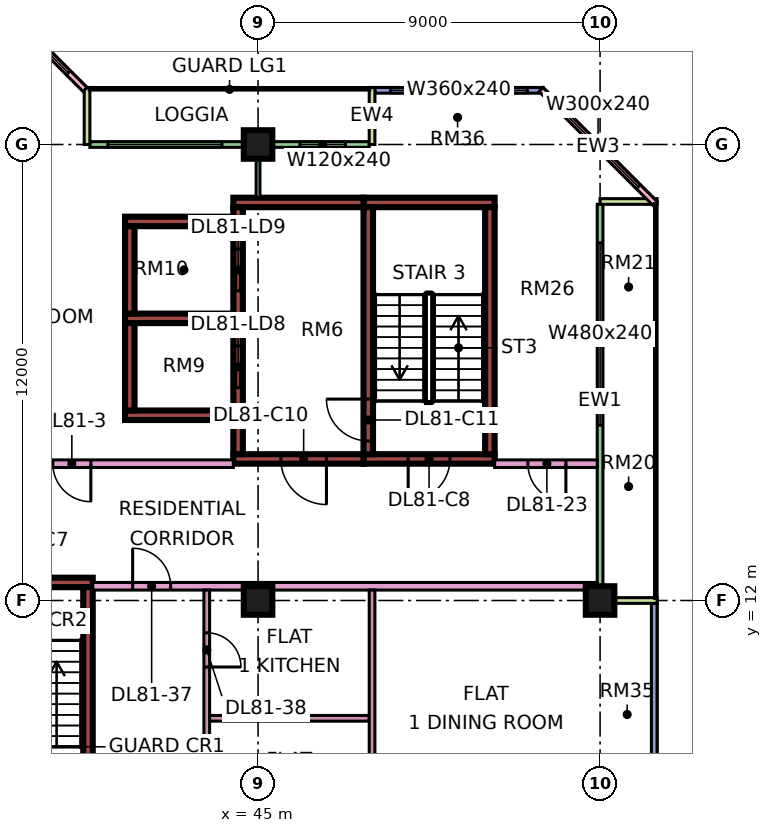
"""IFC4 building model, lengths in metres.
Left out: names, types, materials, properties, quantities, classifications, styles, units other than length and angle.
Written with IfcOpenShell. Run it as: python <this file> out.ifc"""

import sys

from ifc_helpers import new_model, si_unit, direction, frame, frame_2d, origin, origin_2d, place, context, subcontext, project, spatial, rectangle, extrude, element, fill, save


model = new_model("IFC4")
c1 = context("Model", 3, precision=1e-05, world=origin(), true_north=direction((0.0, 1.0)))
c2 = subcontext(c1, "Body", "Model", "MODEL_VIEW")
j1 = project(units=[si_unit("LENGTHUNIT", "METRE"), si_unit("PLANEANGLEUNIT", "RADIAN")], contexts=[c1])
p1 = place(None, origin())
s1 = spatial("IfcSite", under=j1, at=p1, CompositionType="ELEMENT")
p2 = place(p1, origin())
s2 = spatial("IfcBuilding", under=s1, at=p2, CompositionType="ELEMENT")
p3 = place(p2, frame((0.0, 0.0, 350.15)))
s3 = spatial("IfcBuildingStorey", under=s2, at=p3, CompositionType="ELEMENT", Elevation=350.15)
for number, where, z_axis, x_axis in (
    (1, (45.0, 12.0, 0.0), (0.0, 0.0, 1.0), (1.0, 0.0, 0.0)),
    (2, (45.0, 24.0, 0.0), (0.0, 0.0, 1.0), (1.0, 0.0, 0.0)),
    (3, (54.0, 12.0, 0.0), (0.0, 0.0, 1.0), (1.0, 0.0, 0.0)),
):
    element("IfcColumn", number, at=place(p3, frame(where, z_axis=z_axis, x_axis=x_axis)), inside=s3, PredefinedType="COLUMN", context=c2, shape_type="SweptSolid", body=[
        extrude(rectangle(XDim=0.75, YDim=0.75, at=origin_2d()), origin(), (0.0, 0.0, 1.0), 3.75),
    ])
p4 = place(p3, frame((36.375, 12.475, 0.0), z_axis=(0.0, 0.0, 1.0), x_axis=(1.0, 0.0, 0.0)))
e4 = element("IfcWall", 4, at=p4, inside=s3, PredefinedType="SHEAR", context=c2, shape_type="SweptSolid", body=[
    extrude(rectangle(XDim=4.275, YDim=0.25, at=frame_2d((2.137, 0.0))), origin(), (0.0, 0.0, 1.0), 3.75),
])
p5 = place(p4, frame((2.0, 0.0, 0.0)))
e5 = element("IfcOpeningElement", 5, at=p5, cuts=e4, PredefinedType="OPENING", context=c2, shape_type="SweptSolid", body=[
    extrude(rectangle(XDim=1.1, YDim=2.2, at=frame_2d((0.55, 1.1))), frame((0.0, 0.135, 0.0), z_axis=(0.0, -1.0, 0.0), x_axis=(1.0, 0.0, 0.0)), (0.0, 0.0, 1.0), 0.27),
])
p6 = place(p3, frame((40.525, 5.85, 0.0), z_axis=(0.0, 0.0, 1.0), x_axis=(0.0, 1.0, 0.0)))
e6 = element("IfcWall", 6, at=p6, inside=s3, PredefinedType="SHEAR", context=c2, shape_type="SweptSolid", body=[
    extrude(rectangle(XDim=6.5, YDim=0.25, at=frame_2d((3.25, 0.0))), origin(), (0.0, 0.0, 1.0), 3.75),
])
p7 = place(p3, frame((47.775, 15.725, 0.0), z_axis=(0.0, 0.0, 1.0), x_axis=(1.0, 0.0, 0.0)))
e7 = element("IfcWall", 7, at=p7, inside=s3, PredefinedType="SHEAR", context=c2, shape_type="SweptSolid", body=[
    extrude(rectangle(XDim=3.45, YDim=0.25, at=frame_2d((1.725, 0.0))), origin(), (0.0, 0.0, 1.0), 3.75),
])
p8 = place(p7, frame((1.175, 0.0, 0.0)))
e8 = element("IfcOpeningElement", 8, at=p8, cuts=e7, PredefinedType="OPENING", context=c2, shape_type="SweptSolid", body=[
    extrude(rectangle(XDim=1.1, YDim=2.2, at=frame_2d((0.55, 1.1))), frame((0.0, 0.135, 0.0), z_axis=(0.0, -1.0, 0.0), x_axis=(1.0, 0.0, 0.0)), (0.0, 0.0, 1.0), 0.27),
])
p9 = place(p3, frame((47.775, 22.475, 0.0), z_axis=(0.0, 0.0, 1.0), x_axis=(1.0, 0.0, 0.0)))
e9 = element("IfcWall", 9, at=p9, inside=s3, PredefinedType="SHEAR", context=c2, shape_type="SweptSolid", body=[
    extrude(rectangle(XDim=3.45, YDim=0.25, at=frame_2d((1.725, 0.0))), origin(), (0.0, 0.0, 1.0), 3.75),
])
p10 = place(p3, frame((47.9, 15.85, 0.0), z_axis=(0.0, 0.0, 1.0), x_axis=(0.0, 1.0, 0.0)))
e10 = element("IfcWall", 10, at=p10, inside=s3, PredefinedType="SHEAR", context=c2, shape_type="SweptSolid", body=[
    extrude(rectangle(XDim=6.5, YDim=0.25, at=frame_2d((3.25, 0.0))), origin(), (0.0, 0.0, 1.0), 3.75),
])
p11 = place(p10, frame((0.35, 0.0, 0.0)))
e11 = element("IfcOpeningElement", 11, at=p11, cuts=e10, PredefinedType="OPENING", context=c2, shape_type="SweptSolid", body=[
    extrude(rectangle(XDim=1.1, YDim=2.2, at=frame_2d((0.55, 1.1))), frame((0.0, 0.135, 0.0), z_axis=(0.0, -1.0, 0.0), x_axis=(1.0, 0.0, 0.0)), (0.0, 0.0, 1.0), 0.27),
])
p12 = place(p3, frame((51.1, 15.85, 0.0), z_axis=(0.0, 0.0, 1.0), x_axis=(0.0, 1.0, 0.0)))
e12 = element("IfcWall", 12, at=p12, inside=s3, PredefinedType="SHEAR", context=c2, shape_type="SweptSolid", body=[
    extrude(rectangle(XDim=6.5, YDim=0.25, at=frame_2d((3.25, 0.0))), origin(), (0.0, 0.0, 1.0), 3.75),
])
p13 = place(p3, frame((44.35, 15.725, 0.0), z_axis=(0.0, 0.0, 1.0), x_axis=(1.0, 0.0, 0.0)))
e13 = element("IfcWall", 13, at=p13, inside=s3, PredefinedType="SHEAR", context=c2, shape_type="SweptSolid", body=[
    extrude(rectangle(XDim=3.425, YDim=0.25, at=frame_2d((1.712, 0.0))), origin(), (0.0, 0.0, 1.0), 3.75),
])
p14 = place(p13, frame((1.25, 0.0, 0.0)))
e14 = element("IfcOpeningElement", 14, at=p14, cuts=e13, PredefinedType="OPENING", context=c2, shape_type="SweptSolid", body=[
    extrude(rectangle(XDim=1.2, YDim=2.2, at=frame_2d((0.6, 1.1))), frame((0.0, 0.135, 0.0), z_axis=(0.0, -1.0, 0.0), x_axis=(1.0, 0.0, 0.0)), (0.0, 0.0, 1.0), 0.27),
])
p15 = place(p3, frame((44.35, 22.475, 0.0), z_axis=(0.0, 0.0, 1.0), x_axis=(1.0, 0.0, 0.0)))
e15 = element("IfcWall", 15, at=p15, inside=s3, PredefinedType="SHEAR", context=c2, shape_type="SweptSolid", body=[
    extrude(rectangle(XDim=3.425, YDim=0.25, at=frame_2d((1.712, 0.0))), origin(), (0.0, 0.0, 1.0), 3.75),
])
p16 = place(p3, frame((44.475, 15.85, 0.0), z_axis=(0.0, 0.0, 1.0), x_axis=(0.0, 1.0, 0.0)))
e16 = element("IfcWall", 16, at=p16, inside=s3, PredefinedType="SHEAR", context=c2, shape_type="SweptSolid", body=[
    extrude(rectangle(XDim=6.5, YDim=0.25, at=frame_2d((3.25, 0.0))), origin(), (0.0, 0.0, 1.0), 3.75),
])
p17 = place(p16, frame((1.75, 0.0, 0.0)))
e17 = element("IfcOpeningElement", 17, at=p17, cuts=e16, PredefinedType="OPENING", context=c2, shape_type="SweptSolid", body=[
    extrude(rectangle(XDim=1.1, YDim=2.2, at=frame_2d((0.55, 1.1))), frame((0.0, 0.135, 0.0), z_axis=(0.0, -1.0, 0.0), x_axis=(1.0, 0.0, 0.0)), (0.0, 0.0, 1.0), 0.27),
])
p18 = place(p16, frame((4.3, 0.0, 0.0)))
e18 = element("IfcOpeningElement", 18, at=p18, cuts=e16, PredefinedType="OPENING", context=c2, shape_type="SweptSolid", body=[
    extrude(rectangle(XDim=1.1, YDim=2.2, at=frame_2d((0.55, 1.1))), frame((0.0, 0.135, 0.0), z_axis=(0.0, -1.0, 0.0), x_axis=(1.0, 0.0, 0.0)), (0.0, 0.0, 1.0), 0.27),
])
for number, where, z_axis, x_axis in (
    (19, (41.5, 16.875, 0.0), (0.0, 0.0, 1.0), (1.0, 0.0, 0.0)),
    (20, (41.5, 19.425, 0.0), (0.0, 0.0, 1.0), (1.0, 0.0, 0.0)),
    (21, (41.5, 21.975, 0.0), (0.0, 0.0, 1.0), (1.0, 0.0, 0.0)),
):
    element("IfcWall", number, at=place(p3, frame(where, z_axis=z_axis, x_axis=x_axis)), inside=s3, PredefinedType="SHEAR", context=c2, shape_type="SweptSolid", body=[
        extrude(rectangle(XDim=2.85, YDim=0.25, at=frame_2d((1.425, 0.0))), origin(), (0.0, 0.0, 1.0), 3.75),
    ])
for number, where, z_axis, x_axis in (
    (22, (41.625, 17.0, 0.0), (0.0, 0.0, 1.0), (0.0, 1.0, 0.0)),
    (23, (41.625, 19.55, 0.0), (0.0, 0.0, 1.0), (0.0, 1.0, 0.0)),
):
    element("IfcWall", number, at=place(p3, frame(where, z_axis=z_axis, x_axis=x_axis)), inside=s3, PredefinedType="SHEAR", context=c2, shape_type="SweptSolid", body=[
        extrude(rectangle(XDim=2.3, YDim=0.25, at=frame_2d((1.15, 0.0))), origin(), (0.0, 0.0, 1.0), 3.75),
    ])
p19 = place(p3, frame((52.5, 25.425, 0.0), z_axis=(0.0, 0.0, 1.0), x_axis=(-1.0, 0.0, 0.0)))
e24 = element("IfcWall", 24, at=p19, inside=s3, PredefinedType="SOLIDWALL", context=c2, shape_type="SweptSolid", body=[
    extrude(rectangle(XDim=4.425, YDim=0.15, at=frame_2d((2.212, 0.0))), origin(), (0.0, 0.0, 1.0), 3.35),
])
p20 = place(p19, frame((0.413, 0.0, 0.45)))
e25 = element("IfcOpeningElement", 25, at=p20, cuts=e24, PredefinedType="OPENING", context=c2, shape_type="SweptSolid", body=[
    extrude(rectangle(XDim=3.6, YDim=2.4, at=frame_2d((1.8, 1.2))), frame((0.0, 0.085, 0.0), z_axis=(0.0, -1.0, 0.0), x_axis=(1.0, 0.0, 0.0)), (0.0, 0.0, 1.0), 0.17),
])
p21 = place(p3, frame((47.925, 24.0, 0.0), z_axis=(0.0, 0.0, 1.0), x_axis=(-1.0, 0.0, 0.0)))
e26 = element("IfcWall", 26, at=p21, inside=s3, PredefinedType="SOLIDWALL", context=c2, shape_type="SweptSolid", body=[
    extrude(rectangle(XDim=7.35, YDim=0.15, at=frame_2d((3.675, 0.0))), origin(), (0.0, 0.0, 1.0), 3.35),
])
p22 = place(p21, frame((0.625, 0.0, 0.45)))
e27 = element("IfcOpeningElement", 27, at=p22, cuts=e26, PredefinedType="OPENING", context=c2, shape_type="SweptSolid", body=[
    extrude(rectangle(XDim=1.2, YDim=2.4, at=frame_2d((0.6, 1.2))), frame((0.0, 0.085, 0.0), z_axis=(0.0, -1.0, 0.0), x_axis=(1.0, 0.0, 0.0)), (0.0, 0.0, 1.0), 0.17),
])
p23 = place(p21, frame((3.875, 0.0, 0.45)))
e28 = element("IfcOpeningElement", 28, at=p23, cuts=e26, PredefinedType="OPENING", context=c2, shape_type="SweptSolid", body=[
    extrude(rectangle(XDim=3.0, YDim=2.4, at=frame_2d((1.5, 1.2))), frame((0.0, 0.085, 0.0), z_axis=(0.0, -1.0, 0.0), x_axis=(1.0, 0.0, 0.0)), (0.0, 0.0, 1.0), 0.17),
])
for number, where, z_axis, x_axis in (
    (29, (48.0, 25.5, 0.0), (0.0, 0.0, 1.0), (0.0, -1.0, 0.0)),
    (30, (40.5, 25.5, 0.0), (0.0, 0.0, 1.0), (0.0, -1.0, 0.0)),
):
    element("IfcWall", number, at=place(p3, frame(where, z_axis=z_axis, x_axis=x_axis)), inside=s3, PredefinedType="SOLIDWALL", context=c2, shape_type="SweptSolid", body=[
        extrude(rectangle(XDim=1.5, YDim=0.15, at=frame_2d((0.75, 0.0))), origin(), (0.0, 0.0, 1.0), 3.35),
    ])
p24 = place(p3, frame((40.447, 25.447, 0.0), z_axis=(0.0, 0.0, 1.0), x_axis=(-0.707106781187, 0.707106781187, 0.0)))
e31 = element("IfcWall", 31, at=p24, inside=s3, PredefinedType="SOLIDWALL", context=c2, shape_type="SweptSolid", body=[
    extrude(rectangle(XDim=4.243, YDim=0.15, at=frame_2d((2.121, 0.0))), origin(), (0.0, 0.0, 1.0), 3.35),
])
p25 = place(p24, frame((0.621, 0.0, 0.45)))
e32 = element("IfcOpeningElement", 32, at=p25, cuts=e31, PredefinedType="OPENING", context=c2, shape_type="SweptSolid", body=[
    extrude(rectangle(XDim=3.0, YDim=2.4, at=frame_2d((1.5, 1.2))), frame((0.0, 0.085, 0.0), z_axis=(0.0, -1.0, 0.0), x_axis=(1.0, 0.0, 0.0)), (0.0, 0.0, 1.0), 0.17),
])
p26 = place(p3, frame((55.425, 1.5, 0.0), z_axis=(0.0, 0.0, 1.0), x_axis=(0.0, 1.0, 0.0)))
e33 = element("IfcWall", 33, at=p26, inside=s3, PredefinedType="SOLIDWALL", context=c2, shape_type="SweptSolid", body=[
    extrude(rectangle(XDim=10.425, YDim=0.15, at=frame_2d((5.212, 0.0))), origin(), (0.0, 0.0, 1.0), 3.35),
])
p27 = place(p26, frame((0.4, 0.0, 0.45)))
e34 = element("IfcOpeningElement", 34, at=p27, cuts=e33, PredefinedType="OPENING", context=c2, shape_type="SweptSolid", body=[
    extrude(rectangle(XDim=2.4, YDim=2.4, at=frame_2d((1.2, 1.2))), frame((0.0, 0.085, 0.0), z_axis=(0.0, -1.0, 0.0), x_axis=(1.0, 0.0, 0.0)), (0.0, 0.0, 1.0), 0.17),
])
p28 = place(p3, frame((54.0, 12.075, 0.0), z_axis=(0.0, 0.0, 1.0), x_axis=(0.0, 1.0, 0.0)))
e35 = element("IfcWall", 35, at=p28, inside=s3, PredefinedType="SOLIDWALL", context=c2, shape_type="SweptSolid", body=[
    extrude(rectangle(XDim=10.35, YDim=0.15, at=frame_2d((5.175, 0.0))), origin(), (0.0, 0.0, 1.0), 3.35),
])
p29 = place(p28, frame((4.538, 0.0, 0.45)))
e36 = element("IfcOpeningElement", 36, at=p29, cuts=e35, PredefinedType="OPENING", context=c2, shape_type="SweptSolid", body=[
    extrude(rectangle(XDim=4.8, YDim=2.4, at=frame_2d((2.4, 1.2))), frame((0.0, 0.085, 0.0), z_axis=(0.0, -1.0, 0.0), x_axis=(1.0, 0.0, 0.0)), (0.0, 0.0, 1.0), 0.17),
])
for number, where, z_axis, x_axis in (
    (37, (55.5, 12.0, 0.0), (0.0, 0.0, 1.0), (-1.0, 0.0, 0.0)),
    (38, (55.5, 22.5, 0.0), (0.0, 0.0, 1.0), (-1.0, 0.0, 0.0)),
):
    element("IfcWall", number, at=place(p3, frame(where, z_axis=z_axis, x_axis=x_axis)), inside=s3, PredefinedType="SOLIDWALL", context=c2, shape_type="SweptSolid", body=[
        extrude(rectangle(XDim=1.5, YDim=0.15, at=frame_2d((0.75, 0.0))), origin(), (0.0, 0.0, 1.0), 3.35),
    ])
p30 = place(p3, frame((55.447, 22.447, 0.0), z_axis=(0.0, 0.0, 1.0), x_axis=(-0.707106781187, 0.707106781187, 0.0)))
e39 = element("IfcWall", 39, at=p30, inside=s3, PredefinedType="SOLIDWALL", context=c2, shape_type="SweptSolid", body=[
    extrude(rectangle(XDim=4.243, YDim=0.15, at=frame_2d((2.121, 0.0))), origin(), (0.0, 0.0, 1.0), 3.35),
])
p31 = place(p30, frame((0.621, 0.0, 0.45)))
e40 = element("IfcOpeningElement", 40, at=p31, cuts=e39, PredefinedType="OPENING", context=c2, shape_type="SweptSolid", body=[
    extrude(rectangle(XDim=3.0, YDim=2.4, at=frame_2d((1.5, 1.2))), frame((0.0, 0.085, 0.0), z_axis=(0.0, -1.0, 0.0), x_axis=(1.0, 0.0, 0.0)), (0.0, 0.0, 1.0), 0.17),
])
p32 = place(p3, frame((34.0, 15.6, 0.0), z_axis=(0.0, 0.0, 1.0), x_axis=(1.0, 0.0, 0.0)))
e41 = element("IfcWall", 41, at=p32, inside=s3, PredefinedType="PARTITIONING", context=c2, shape_type="SweptSolid", body=[
    extrude(rectangle(XDim=10.35, YDim=0.2, at=frame_2d((5.175, 0.0))), origin(), (0.0, 0.0, 1.0), 3.35),
])
p33 = place(p32, frame((5.6, 0.0, 0.0)))
e42 = element("IfcOpeningElement", 42, at=p33, cuts=e41, PredefinedType="OPENING", context=c2, shape_type="SweptSolid", body=[
    extrude(rectangle(XDim=1.0, YDim=2.1, at=frame_2d((0.5, 1.05))), frame((0.0, 0.11, 0.0), z_axis=(0.0, -1.0, 0.0), x_axis=(1.0, 0.0, 0.0)), (0.0, 0.0, 1.0), 0.22),
])
p34 = place(p32, frame((0.45, 0.0, 0.0)))
e43 = element("IfcOpeningElement", 43, at=p34, cuts=e41, PredefinedType="OPENING", context=c2, shape_type="SweptSolid", body=[
    extrude(rectangle(XDim=1.2, YDim=2.1, at=frame_2d((0.6, 1.05))), frame((0.0, 0.11, 0.0), z_axis=(0.0, -1.0, 0.0), x_axis=(1.0, 0.0, 0.0)), (0.0, 0.0, 1.0), 0.22),
])
p35 = place(p3, frame((40.65, 12.375, 0.0), z_axis=(0.0, 0.0, 1.0), x_axis=(1.0, 0.0, 0.0)))
e44 = element("IfcWall", 44, at=p35, inside=s3, PredefinedType="PARTITIONING", context=c2, shape_type="SweptSolid", body=[
    extrude(rectangle(XDim=13.276, YDim=0.2, at=frame_2d((6.638, 0.0))), origin(), (0.0, 0.0, 1.0), 3.35),
])
p36 = place(p35, frame((1.05, 0.0, 0.0)))
e45 = element("IfcOpeningElement", 45, at=p36, cuts=e44, PredefinedType="OPENING", context=c2, shape_type="SweptSolid", body=[
    extrude(rectangle(XDim=1.0, YDim=2.1, at=frame_2d((0.5, 1.05))), frame((0.0, 0.11, 0.0), z_axis=(0.0, -1.0, 0.0), x_axis=(1.0, 0.0, 0.0)), (0.0, 0.0, 1.0), 0.22),
])
p37 = place(p3, frame((43.65, 5.975, 0.0), z_axis=(0.0, 0.0, 1.0), x_axis=(0.0, 1.0, 0.0)))
e46 = element("IfcWall", 46, at=p37, inside=s3, PredefinedType="PARTITIONING", context=c2, shape_type="SweptSolid", body=[
    extrude(rectangle(XDim=6.3, YDim=0.15, at=frame_2d((3.15, 0.0))), origin(), (0.0, 0.0, 1.0), 3.35),
])
p38 = place(p37, frame((4.275, 0.0, 0.0)))
e47 = element("IfcOpeningElement", 47, at=p38, cuts=e46, PredefinedType="OPENING", context=c2, shape_type="SweptSolid", body=[
    extrude(rectangle(XDim=0.9, YDim=2.1, at=frame_2d((0.45, 1.05))), frame((0.0, 0.085, 0.0), z_axis=(0.0, -1.0, 0.0), x_axis=(1.0, 0.0, 0.0)), (0.0, 0.0, 1.0), 0.17),
])
p39 = place(p3, frame((43.725, 8.9, 0.0), z_axis=(0.0, 0.0, 1.0), x_axis=(1.0, 0.0, 0.0)))
e48 = element("IfcWall", 48, at=p39, inside=s3, PredefinedType="PARTITIONING", context=c2, shape_type="SweptSolid", body=[
    extrude(rectangle(XDim=4.2, YDim=0.15, at=frame_2d((2.1, 0.0))), origin(), (0.0, 0.0, 1.0), 3.35),
])
p40 = place(p3, frame((45.0, 22.6, 0.0), z_axis=(0.0, 0.0, 1.0), x_axis=(0.0, 1.0, 0.0)))
e49 = element("IfcWall", 49, at=p40, inside=s3, PredefinedType="PARTITIONING", context=c2, shape_type="SweptSolid", body=[
    extrude(rectangle(XDim=1.326, YDim=0.1, at=frame_2d((0.663, 0.0))), origin(), (0.0, 0.0, 1.0), 3.35),
])
p41 = place(p3, frame((48.0, 5.975, 0.0), z_axis=(0.0, 0.0, 1.0), x_axis=(0.0, 1.0, 0.0)))
e50 = element("IfcWall", 50, at=p41, inside=s3, PredefinedType="PARTITIONING", context=c2, shape_type="SweptSolid", body=[
    extrude(rectangle(XDim=6.3, YDim=0.15, at=frame_2d((3.15, 0.0))), origin(), (0.0, 0.0, 1.0), 3.35),
])
p42 = place(p3, frame((51.225, 15.6, 0.0), z_axis=(0.0, 0.0, 1.0), x_axis=(1.0, 0.0, 0.0)))
e51 = element("IfcWall", 51, at=p42, inside=s3, PredefinedType="PARTITIONING", context=c2, shape_type="SweptSolid", body=[
    extrude(rectangle(XDim=2.701, YDim=0.2, at=frame_2d((1.351, 0.0))), origin(), (0.0, 0.0, 1.0), 3.35),
])
p43 = place(p42, frame((0.875, 0.0, 0.0)))
e52 = element("IfcOpeningElement", 52, at=p43, cuts=e51, PredefinedType="OPENING", context=c2, shape_type="SweptSolid", body=[
    extrude(rectangle(XDim=1.0, YDim=2.1, at=frame_2d((0.5, 1.05))), frame((0.0, 0.11, 0.0), z_axis=(0.0, -1.0, 0.0), x_axis=(1.0, 0.0, 0.0)), (0.0, 0.0, 1.0), 0.22),
])
p44 = place(p20, origin())
e53 = element("IfcWindow", 53, at=p44, inside=s3, PartitioningType="SINGLE_PANEL", PredefinedType="WINDOW", context=c2, shape_type="SweptSolid", body=[
    extrude(rectangle(XDim=3.6, YDim=2.4, at=frame_2d((1.8, 1.2))), frame((0.0, 0.03, 0.0), z_axis=(0.0, -1.0, 0.0), x_axis=(1.0, 0.0, 0.0)), (0.0, 0.0, 1.0), 0.06),
])
fill(e25, e53)
p45 = place(p22, origin())
e54 = element("IfcWindow", 54, at=p45, inside=s3, PartitioningType="SINGLE_PANEL", PredefinedType="WINDOW", context=c2, shape_type="SweptSolid", body=[
    extrude(rectangle(XDim=1.2, YDim=2.4, at=frame_2d((0.6, 1.2))), frame((0.0, 0.03, 0.0), z_axis=(0.0, -1.0, 0.0), x_axis=(1.0, 0.0, 0.0)), (0.0, 0.0, 1.0), 0.06),
])
fill(e27, e54)
p46 = place(p23, origin())
e55 = element("IfcWindow", 55, at=p46, inside=s3, PartitioningType="SINGLE_PANEL", PredefinedType="WINDOW", context=c2, shape_type="SweptSolid", body=[
    extrude(rectangle(XDim=3.0, YDim=2.4, at=frame_2d((1.5, 1.2))), frame((0.0, 0.03, 0.0), z_axis=(0.0, -1.0, 0.0), x_axis=(1.0, 0.0, 0.0)), (0.0, 0.0, 1.0), 0.06),
])
fill(e28, e55)
p47 = place(p25, origin())
e56 = element("IfcWindow", 56, at=p47, inside=s3, PartitioningType="SINGLE_PANEL", PredefinedType="WINDOW", context=c2, shape_type="SweptSolid", body=[
    extrude(rectangle(XDim=3.0, YDim=2.4, at=frame_2d((1.5, 1.2))), frame((0.0, 0.03, 0.0), z_axis=(0.0, -1.0, 0.0), x_axis=(1.0, 0.0, 0.0)), (0.0, 0.0, 1.0), 0.06),
])
fill(e32, e56)
p48 = place(p29, origin())
e57 = element("IfcWindow", 57, at=p48, inside=s3, PartitioningType="SINGLE_PANEL", PredefinedType="WINDOW", context=c2, shape_type="SweptSolid", body=[
    extrude(rectangle(XDim=4.8, YDim=2.4, at=frame_2d((2.4, 1.2))), frame((0.0, 0.03, 0.0), z_axis=(0.0, -1.0, 0.0), x_axis=(1.0, 0.0, 0.0)), (0.0, 0.0, 1.0), 0.06),
])
fill(e36, e57)
p49 = place(p31, origin())
e58 = element("IfcWindow", 58, at=p49, inside=s3, PartitioningType="SINGLE_PANEL", PredefinedType="WINDOW", context=c2, shape_type="SweptSolid", body=[
    extrude(rectangle(XDim=3.0, YDim=2.4, at=frame_2d((1.5, 1.2))), frame((0.0, 0.03, 0.0), z_axis=(0.0, -1.0, 0.0), x_axis=(1.0, 0.0, 0.0)), (0.0, 0.0, 1.0), 0.06),
])
fill(e40, e58)
p50 = place(p8, frame((1.1, 0.0, 0.0), z_axis=(0.0, 0.0, 1.0), x_axis=(-1.0, 0.0, 0.0)))
e59 = element("IfcDoor", 59, at=p50, inside=s3, OperationType="SINGLE_SWING_LEFT", PredefinedType="DOOR", context=c2, shape_type="SweptSolid", body=[
    extrude(rectangle(XDim=1.1, YDim=2.2, at=frame_2d((0.55, 1.1))), frame((0.0, 0.025, 0.0), z_axis=(0.0, -1.0, 0.0), x_axis=(1.0, 0.0, 0.0)), (0.0, 0.0, 1.0), 0.05),
])
fill(e8, e59)
p51 = place(p14, origin())
e60 = element("IfcDoor", 60, at=p51, inside=s3, OperationType="SINGLE_SWING_RIGHT", PredefinedType="DOOR", context=c2, shape_type="SweptSolid", body=[
    extrude(rectangle(XDim=1.2, YDim=2.2, at=frame_2d((0.6, 1.1))), frame((0.0, 0.025, 0.0), z_axis=(0.0, -1.0, 0.0), x_axis=(1.0, 0.0, 0.0)), (0.0, 0.0, 1.0), 0.05),
])
fill(e14, e60)
p52 = place(p11, frame((1.1, 0.0, 0.0), z_axis=(0.0, 0.0, 1.0), x_axis=(-1.0, 0.0, 0.0)))
e61 = element("IfcDoor", 61, at=p52, inside=s3, OperationType="SINGLE_SWING_RIGHT", PredefinedType="DOOR", context=c2, shape_type="SweptSolid", body=[
    extrude(rectangle(XDim=1.1, YDim=2.2, at=frame_2d((0.55, 1.1))), frame((0.0, 0.025, 0.0), z_axis=(0.0, -1.0, 0.0), x_axis=(1.0, 0.0, 0.0)), (0.0, 0.0, 1.0), 0.05),
])
fill(e11, e61)
p53 = place(p17, origin())
e62 = element("IfcDoor", 62, at=p53, inside=s3, OperationType="DOUBLE_DOOR_SLIDING", PredefinedType="DOOR", context=c2, shape_type="SweptSolid", body=[
    extrude(rectangle(XDim=1.1, YDim=2.2, at=frame_2d((0.55, 1.1))), frame((0.0, 0.025, 0.0), z_axis=(0.0, -1.0, 0.0), x_axis=(1.0, 0.0, 0.0)), (0.0, 0.0, 1.0), 0.05),
])
fill(e17, e62)
p54 = place(p18, origin())
e63 = element("IfcDoor", 63, at=p54, inside=s3, OperationType="DOUBLE_DOOR_SLIDING", PredefinedType="DOOR", context=c2, shape_type="SweptSolid", body=[
    extrude(rectangle(XDim=1.1, YDim=2.2, at=frame_2d((0.55, 1.1))), frame((0.0, 0.025, 0.0), z_axis=(0.0, -1.0, 0.0), x_axis=(1.0, 0.0, 0.0)), (0.0, 0.0, 1.0), 0.05),
])
fill(e18, e63)
p55 = place(p33, origin())
e64 = element("IfcDoor", 64, at=p55, inside=s3, OperationType="SINGLE_SWING_RIGHT", PredefinedType="DOOR", context=c2, shape_type="SweptSolid", body=[
    extrude(rectangle(XDim=1.0, YDim=2.1, at=frame_2d((0.5, 1.05))), frame((0.0, 0.025, 0.0), z_axis=(0.0, -1.0, 0.0), x_axis=(1.0, 0.0, 0.0)), (0.0, 0.0, 1.0), 0.05),
])
fill(e42, e64)
p56 = place(p43, origin())
e65 = element("IfcDoor", 65, at=p56, inside=s3, OperationType="SINGLE_SWING_RIGHT", PredefinedType="DOOR", context=c2, shape_type="SweptSolid", body=[
    extrude(rectangle(XDim=1.0, YDim=2.1, at=frame_2d((0.5, 1.05))), frame((0.0, 0.025, 0.0), z_axis=(0.0, -1.0, 0.0), x_axis=(1.0, 0.0, 0.0)), (0.0, 0.0, 1.0), 0.05),
])
fill(e52, e65)
p57 = place(p36, origin())
e66 = element("IfcDoor", 66, at=p57, inside=s3, OperationType="SINGLE_SWING_LEFT", PredefinedType="DOOR", context=c2, shape_type="SweptSolid", body=[
    extrude(rectangle(XDim=1.0, YDim=2.1, at=frame_2d((0.5, 1.05))), frame((0.0, 0.025, 0.0), z_axis=(0.0, -1.0, 0.0), x_axis=(1.0, 0.0, 0.0)), (0.0, 0.0, 1.0), 0.05),
])
fill(e45, e66)
p58 = place(p38, frame((0.9, 0.0, 0.0), z_axis=(0.0, 0.0, 1.0), x_axis=(-1.0, 0.0, 0.0)))
e67 = element("IfcDoor", 67, at=p58, inside=s3, OperationType="SINGLE_SWING_LEFT", PredefinedType="DOOR", context=c2, shape_type="SweptSolid", body=[
    extrude(rectangle(XDim=0.9, YDim=2.1, at=frame_2d((0.45, 1.05))), frame((0.0, 0.025, 0.0), z_axis=(0.0, -1.0, 0.0), x_axis=(1.0, 0.0, 0.0)), (0.0, 0.0, 1.0), 0.05),
])
fill(e47, e67)
save(model, sys.argv[1])
